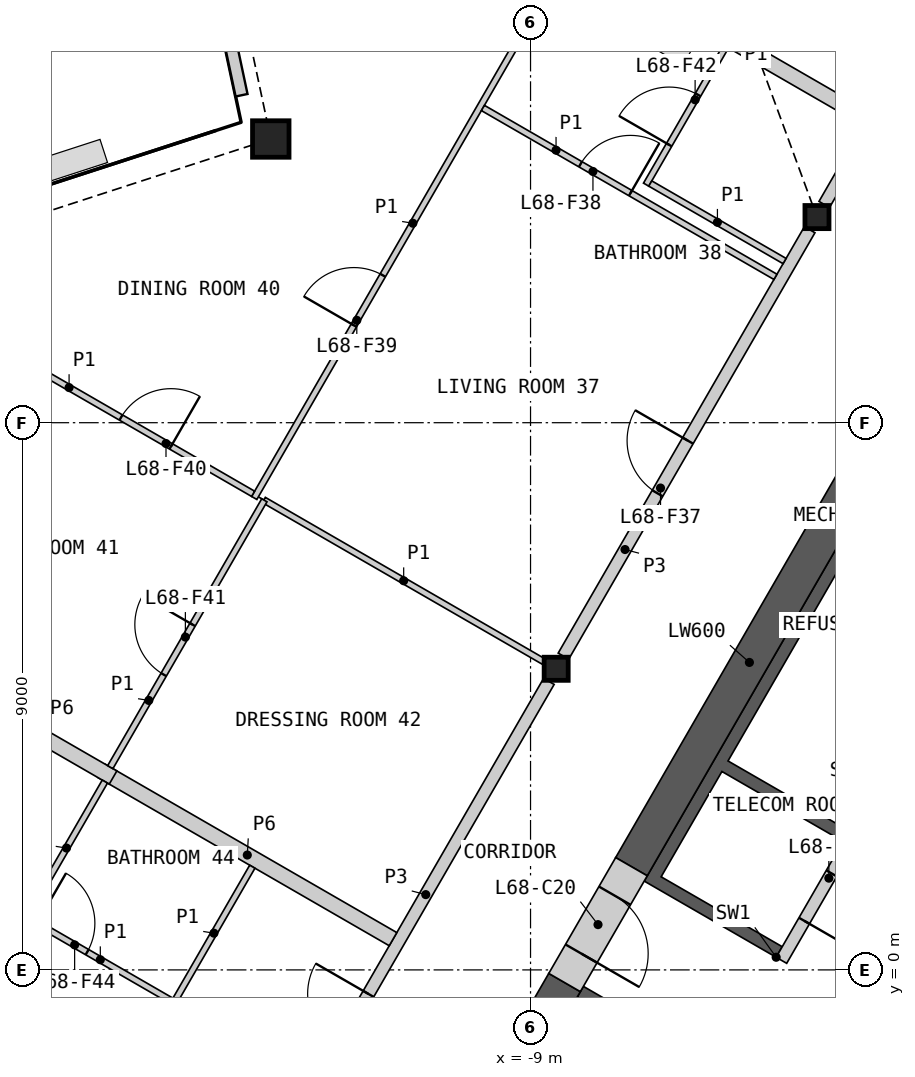
"""IFC4 building model, lengths in metres.
Left out: names, types, materials, properties, quantities, classifications, styles, units other than length and angle.
Written with IfcOpenShell. Run it as: python <this file> out.ifc"""

import sys

from ifc_helpers import new_model, si_unit, direction, frame, frame_2d, origin, origin_2d, place, context, subcontext, project, spatial, polyline, rectangle, hollow_rectangle, i_section, outline, extrude, element, fill, save


model = new_model("IFC4")
c1 = context("Model", 3, precision=1e-05, world=origin(), true_north=direction((0.0, 1.0)))
c2 = subcontext(c1, "Body", "Model", "MODEL_VIEW")
j1 = project(units=[si_unit("LENGTHUNIT", "METRE"), si_unit("PLANEANGLEUNIT", "RADIAN")], contexts=[c1])
p1 = place(None, origin())
s1 = spatial("IfcSite", under=j1, at=p1, CompositionType="ELEMENT")
p2 = place(p1, origin())
s2 = spatial("IfcBuilding", under=s1, at=p2, CompositionType="ELEMENT")
p3 = place(p2, frame((0.0, 0.0, 312.0)))
s3 = spatial("IfcBuildingStorey", under=s2, at=p3, CompositionType="ELEMENT", Elevation=312.0)
p4 = place(p3, frame((-13.272, 13.666, 0.0), z_axis=(0.0, 0.0, 1.0), x_axis=(1.0, 0.0, 0.0)))
e1 = element("IfcColumn", 1, at=p4, inside=s3, PredefinedType="COLUMN", context=c2, shape_type="SweptSolid", body=[
    extrude(hollow_rectangle(XDim=0.6, YDim=0.6, WallThickness=0.04, at=origin_2d()), origin(), (0.0, 0.0, 1.0), 3.4),
])
for number, where, z_axis, x_axis in (
    (2, (-4.289, 12.382, 0.0), (0.0, 0.0, 1.0), (1.0, 0.0, 0.0)),
    (3, (-8.578, 4.953, 0.0), (0.0, 0.0, 1.0), (1.0, 0.0, 0.0)),
):
    element("IfcColumn", number, at=place(p3, frame(where, z_axis=z_axis, x_axis=x_axis)), inside=s3, PredefinedType="COLUMN", context=c2, shape_type="SweptSolid", body=[
        extrude(i_section(OverallWidth=0.396, OverallDepth=0.381, WebThickness=0.019, FlangeThickness=0.03, at=origin_2d()), origin(), (0.0, 0.0, 1.0), 3.4),
    ])
p5 = place(p3, frame((-15.025, 20.372, 0.0), z_axis=(0.0, 0.0, 1.0), x_axis=(0.207932234858, -0.978143233738, 0.0)))
e4 = element("IfcWall", 4, at=p5, inside=s3, PredefinedType="SOLIDWALL", context=c2, shape_type="SweptSolid", body=[
    extrude(rectangle(XDim=6.12, YDim=0.2, at=frame_2d((3.06, 0.0))), origin(), (0.0, 0.0, 1.0), 2.488),
])
p6 = place(p5, frame((2.26, 0.0, 0.0)))
e5 = element("IfcOpeningElement", 5, at=p6, cuts=e4, PredefinedType="OPENING", context=c2, shape_type="SweptSolid", body=[
    extrude(rectangle(XDim=1.6, YDim=2.25, at=frame_2d((0.8, 1.125))), frame((0.0, 0.11, 0.0), z_axis=(0.0, -1.0, 0.0), x_axis=(1.0, 0.0, 0.0)), (0.0, 0.0, 1.0), 0.22),
])
p7 = place(p3, origin())
e6 = element("IfcWall", 6, at=p7, inside=s3, PredefinedType="SHEAR", context=c2, shape_type="SweptSolid", body=[
    extrude(outline(polyline([(-6.061, -1.697), (-8.231, -0.444), (-8.131, -0.271), (-5.96, -1.524), (-6.061, -1.697)])), origin(), (0.0, 0.0, 1.0), 3.1),
])
p8 = place(p3, origin())
e7 = element("IfcWall", 7, at=p8, inside=s3, PredefinedType="SHEAR", context=c2, shape_type="SweptSolid", body=[
    extrude(outline(polyline([(-4.96, 0.208), (-7.131, 1.461), (-3.731, 7.35), (-1.561, 6.097), (-1.66, 5.924), (-3.652, 7.074), (-5.752, 3.437), (-3.76, 2.287), (-3.861, 2.113), (-5.852, 3.263), (-6.852, 1.531), (-4.861, 0.381), (-4.96, 0.208)])), origin(), (0.0, 0.0, 1.0), 3.1),
])
p9 = place(p3, frame((-1.631, 5.776, 0.0), z_axis=(0.0, 0.0, 1.0), x_axis=(-0.499992876559, -0.866029516466, 0.0)))
e8 = element("IfcWall", 8, at=p9, inside=s3, PredefinedType="SOLIDWALL", context=c2, shape_type="SweptSolid", body=[
    extrude(rectangle(XDim=6.486, YDim=0.2, at=frame_2d((3.243, 0.0))), origin(), (0.0, 0.0, 1.0), 3.1),
])
p10 = place(p9, frame((1.537, 0.0, 0.0)))
e9 = element("IfcOpeningElement", 9, at=p10, cuts=e8, PredefinedType="OPENING", context=c2, shape_type="SweptSolid", body=[
    extrude(rectangle(XDim=0.9, YDim=2.1, at=frame_2d((0.45, 1.05))), frame((0.0, 0.11, 0.0), z_axis=(0.0, -1.0, 0.0), x_axis=(1.0, 0.0, 0.0)), (0.0, 0.0, 1.0), 0.22),
])
p11 = place(p9, frame((4.837, 0.0, 0.0)))
e10 = element("IfcOpeningElement", 10, at=p11, cuts=e8, PredefinedType="OPENING", context=c2, shape_type="SweptSolid", body=[
    extrude(rectangle(XDim=0.9, YDim=2.1, at=frame_2d((0.45, 1.05))), frame((0.0, 0.11, 0.0), z_axis=(0.0, -1.0, 0.0), x_axis=(1.0, 0.0, 0.0)), (0.0, 0.0, 1.0), 0.22),
])
p12 = place(p3, frame((-3.461, 8.417, 0.0), z_axis=(0.0, 0.0, 1.0), x_axis=(-0.50000391502, -0.866023143435, 0.0)))
e11 = element("IfcWall", 11, at=p12, inside=s3, PredefinedType="SHEAR", context=c2, shape_type="SweptSolid", body=[
    extrude(rectangle(XDim=7.759, YDim=0.6, at=frame_2d((3.879, 0.0))), origin(), (0.0, 0.0, 1.0), 3.1),
])
p13 = place(p3, frame((-8.44, -0.208, 0.0), z_axis=(0.0, 0.0, 1.0), x_axis=(-0.500007425856, -0.866021116422, 0.0)))
e12 = element("IfcWall", 12, at=p13, inside=s3, PredefinedType="SHEAR", context=c2, shape_type="SweptSolid", body=[
    extrude(rectangle(XDim=4.969, YDim=0.6, at=frame_2d((2.484, 0.0))), origin(), (0.0, 0.0, 1.0), 3.1),
])
p14 = place(p3, frame((-7.34, 1.698, 0.0), z_axis=(0.0, 0.0, 1.0), x_axis=(-0.50002983664, -0.866008176907, 0.0)))
e13 = element("IfcWall", 13, at=p14, inside=s3, PredefinedType="SHEAR", context=c2, shape_type="SweptSolid", body=[
    extrude(rectangle(XDim=2.2, YDim=0.6, at=frame_2d((1.1, 0.0))), origin(), (0.0, 0.0, 1.0), 3.1),
])
p15 = place(p14, frame((0.55, 0.0, 0.0)))
e14 = element("IfcOpeningElement", 14, at=p15, cuts=e13, PredefinedType="OPENING", context=c2, shape_type="SweptSolid", body=[
    extrude(rectangle(XDim=1.1, YDim=2.1, at=frame_2d((0.55, 1.05))), frame((0.0, 0.31, 0.0), z_axis=(0.0, -1.0, 0.0), x_axis=(1.0, 0.0, 0.0)), (0.0, 0.0, 1.0), 0.62),
])
p16 = place(p3, frame((-8.458, 5.16, 0.0), z_axis=(0.0, 0.0, 1.0), x_axis=(0.499984266882, 0.866034487114, 0.0)))
e15 = element("IfcWall", 15, at=p16, inside=s3, PredefinedType="PARTITIONING", context=c2, shape_type="SweptSolid", body=[
    extrude(rectangle(XDim=8.099, YDim=0.2, at=frame_2d((4.049, 0.0))), origin(), (0.0, 0.0, 1.0), 3.1),
])
p17 = place(p16, frame((3.093, 0.0, 0.0)))
e16 = element("IfcOpeningElement", 16, at=p17, cuts=e15, PredefinedType="OPENING", context=c2, shape_type="SweptSolid", body=[
    extrude(rectangle(XDim=1.0, YDim=2.1, at=frame_2d((0.5, 1.05))), frame((0.0, 0.11, 0.0), z_axis=(0.0, -1.0, 0.0), x_axis=(1.0, 0.0, 0.0)), (0.0, 0.0, 1.0), 0.22),
])
p18 = place(p3, frame((-12.748, -2.269, 0.0), z_axis=(0.0, 0.0, 1.0), x_axis=(0.499984266882, 0.866034487114, 0.0)))
e17 = element("IfcWall", 17, at=p18, inside=s3, PredefinedType="PARTITIONING", context=c2, shape_type="SweptSolid", body=[
    extrude(rectangle(XDim=8.099, YDim=0.2, at=frame_2d((4.049, 0.0))), origin(), (0.0, 0.0, 1.0), 3.1),
])
p19 = place(p18, frame((1.164, 0.0, 0.0)))
e18 = element("IfcOpeningElement", 18, at=p19, cuts=e17, PredefinedType="OPENING", context=c2, shape_type="SweptSolid", body=[
    extrude(rectangle(XDim=1.0, YDim=2.1, at=frame_2d((0.5, 1.05))), frame((0.0, 0.11, 0.0), z_axis=(0.0, -1.0, 0.0), x_axis=(1.0, 0.0, 0.0)), (0.0, 0.0, 1.0), 0.22),
])
p20 = place(p3, frame((-16.055, 3.273, 0.0), z_axis=(0.0, 0.0, 1.0), x_axis=(0.866019581949, -0.500010083578, 0.0)))
e19 = element("IfcWall", 19, at=p20, inside=s3, PredefinedType="PARTITIONING", context=c2, shape_type="SweptSolid", body=[
    extrude(rectangle(XDim=5.535, YDim=0.25, at=frame_2d((2.768, 0.0))), origin(), (0.0, 0.0, 1.0), 2.33),
])
p21 = place(p3, frame((-8.257, 16.76, 0.0), z_axis=(0.0, 0.0, 1.0), x_axis=(0.866034739526, -0.499983829672, 0.0)))
e20 = element("IfcWall", 20, at=p21, inside=s3, PredefinedType="PARTITIONING", context=c2, shape_type="SweptSolid", body=[
    extrude(rectangle(XDim=5.525, YDim=0.25, at=frame_2d((2.763, 0.0))), origin(), (0.0, 0.0, 1.0), 2.33),
])
p22 = place(p3, frame((-4.169, 12.59, 0.0), z_axis=(0.0, 0.0, 1.0), x_axis=(0.499950370306, 0.866054055606, 0.0)))
e21 = element("IfcWall", 21, at=p22, inside=s3, PredefinedType="PARTITIONING", context=c2, shape_type="SweptSolid", body=[
    extrude(rectangle(XDim=4.513, YDim=0.2, at=frame_2d((2.256, 0.0))), origin(), (0.0, 0.0, 1.0), 3.1),
])
p23 = place(p22, frame((2.459, 0.0, 0.0)))
e22 = element("IfcOpeningElement", 22, at=p23, cuts=e21, PredefinedType="OPENING", context=c2, shape_type="SweptSolid", body=[
    extrude(rectangle(XDim=1.0, YDim=2.1, at=frame_2d((0.5, 1.05))), frame((0.0, 0.11, 0.0), z_axis=(0.0, -1.0, 0.0), x_axis=(1.0, 0.0, 0.0)), (0.0, 0.0, 1.0), 0.22),
])
p24 = place(p3, frame((-18.092, 4.449, 0.0), z_axis=(0.0, 0.0, 1.0), x_axis=(0.866043267704, -0.499969057507, 0.0)))
e23 = element("IfcWall", 23, at=p24, inside=s3, PredefinedType="PARTITIONING", context=c2, shape_type="SweptSolid", body=[
    extrude(rectangle(XDim=2.571, YDim=0.25, at=frame_2d((1.286, 0.0))), origin(), (0.0, 0.0, 1.0), 2.33),
])
p25 = place(p3, frame((-24.815, 2.334, 0.0), z_axis=(0.0, 0.0, 1.0), x_axis=(0.866024591023, -0.500001407741, 0.0)))
e24 = element("IfcWall", 24, at=p25, inside=s3, PredefinedType="PARTITIONING", context=c2, shape_type="SweptSolid", body=[
    extrude(rectangle(XDim=12.652, YDim=0.1, at=frame_2d((6.326, 0.0))), origin(), (0.0, 0.0, 1.0), 2.33),
])
p26 = place(p25, frame((2.95, 0.0, 0.0)))
e25 = element("IfcOpeningElement", 25, at=p26, cuts=e24, PredefinedType="OPENING", context=c2, shape_type="SweptSolid", body=[
    extrude(rectangle(XDim=0.95, YDim=2.1, at=frame_2d((0.475, 1.05))), frame((0.0, 0.06, 0.0), z_axis=(0.0, -1.0, 0.0), x_axis=(1.0, 0.0, 0.0)), (0.0, 0.0, 1.0), 0.12),
])
p27 = place(p3, frame((-13.544, 7.762, 0.0), z_axis=(0.0, 0.0, 1.0), x_axis=(0.499993819111, 0.866028972293, 0.0)))
e26 = element("IfcWall", 26, at=p27, inside=s3, PredefinedType="PARTITIONING", context=c2, shape_type="SweptSolid", body=[
    extrude(rectangle(XDim=10.436, YDim=0.1, at=frame_2d((5.218, 0.0))), origin(), (0.0, 0.0, 1.0), 2.33),
])
p28 = place(p27, frame((3.279, 0.0, 0.0)))
e27 = element("IfcOpeningElement", 27, at=p28, cuts=e26, PredefinedType="OPENING", context=c2, shape_type="SweptSolid", body=[
    extrude(rectangle(XDim=0.95, YDim=2.1, at=frame_2d((0.475, 1.05))), frame((0.0, 0.06, 0.0), z_axis=(0.0, -1.0, 0.0), x_axis=(1.0, 0.0, 0.0)), (0.0, 0.0, 1.0), 0.12),
])
p29 = place(p3, frame((-19.615, 11.325, 0.0), z_axis=(0.0, 0.0, 1.0), x_axis=(0.866013987544, -0.500019772988, 0.0)))
e28 = element("IfcWall", 28, at=p29, inside=s3, PredefinedType="PARTITIONING", context=c2, shape_type="SweptSolid", body=[
    extrude(rectangle(XDim=6.99, YDim=0.1, at=frame_2d((3.495, 0.0))), origin(), (0.0, 0.0, 1.0), 2.33),
])
p30 = place(p29, frame((4.48, 0.0, 0.0)))
e29 = element("IfcOpeningElement", 29, at=p30, cuts=e28, PredefinedType="OPENING", context=c2, shape_type="SweptSolid", body=[
    extrude(rectangle(XDim=0.95, YDim=2.1, at=frame_2d((0.475, 1.05))), frame((0.0, 0.06, 0.0), z_axis=(0.0, -1.0, 0.0), x_axis=(1.0, 0.0, 0.0)), (0.0, 0.0, 1.0), 0.12),
])
p31 = place(p3, frame((-9.783, 14.177, 0.0), z_axis=(0.0, 0.0, 1.0), x_axis=(0.866030435321, -0.499991285022, 0.0)))
e30 = element("IfcWall", 30, at=p31, inside=s3, PredefinedType="PARTITIONING", context=c2, shape_type="SweptSolid", body=[
    extrude(rectangle(XDim=5.555, YDim=0.1, at=frame_2d((2.778, 0.0))), origin(), (0.0, 0.0, 1.0), 2.33),
])
p32 = place(p31, frame((1.852, 0.0, 0.0)))
e31 = element("IfcOpeningElement", 31, at=p32, cuts=e30, PredefinedType="OPENING", context=c2, shape_type="SweptSolid", body=[
    extrude(rectangle(XDim=0.95, YDim=2.1, at=frame_2d((0.475, 1.05))), frame((0.0, 0.06, 0.0), z_axis=(0.0, -1.0, 0.0), x_axis=(1.0, 0.0, 0.0)), (0.0, 0.0, 1.0), 0.12),
])
p33 = place(p3, frame((-7.099, 12.915, 0.0), z_axis=(0.0, 0.0, 1.0), x_axis=(0.49997732567, 0.866038494419, 0.0)))
e32 = element("IfcWall", 32, at=p33, inside=s3, PredefinedType="PARTITIONING", context=c2, shape_type="SweptSolid", body=[
    extrude(rectangle(XDim=5.5, YDim=0.1, at=frame_2d((2.75, 0.0))), origin(), (0.0, 0.0, 1.0), 2.33),
])
p34 = place(p33, frame((0.756, 0.0, 0.0)))
e33 = element("IfcOpeningElement", 33, at=p34, cuts=e32, PredefinedType="OPENING", context=c2, shape_type="SweptSolid", body=[
    extrude(rectangle(XDim=0.95, YDim=2.1, at=frame_2d((0.475, 1.05))), frame((0.0, 0.06, 0.0), z_axis=(0.0, -1.0, 0.0), x_axis=(1.0, 0.0, 0.0)), (0.0, 0.0, 1.0), 0.12),
])
p35 = place(p3, frame((-13.386, 7.729, 0.0), z_axis=(0.0, 0.0, 1.0), x_axis=(0.866034036823, -0.49998504684, 0.0)))
e34 = element("IfcWall", 34, at=p35, inside=s3, PredefinedType="PARTITIONING", context=c2, shape_type="SweptSolid", body=[
    extrude(rectangle(XDim=5.312, YDim=0.1, at=frame_2d((2.656, 0.0))), origin(), (0.0, 0.0, 1.0), 2.33),
])
p36 = place(p3, frame((-15.912, 3.335, 0.0), z_axis=(0.0, 0.0, 1.0), x_axis=(0.49999906822, 0.866025941747, 0.0)))
e35 = element("IfcWall", 35, at=p36, inside=s3, PredefinedType="PARTITIONING", context=c2, shape_type="SweptSolid", body=[
    extrude(rectangle(XDim=5.068, YDim=0.1, at=frame_2d((2.534, 0.0))), origin(), (0.0, 0.0, 1.0), 2.33),
])
p37 = place(p36, frame((1.757, 0.0, 0.0)))
e36 = element("IfcOpeningElement", 36, at=p37, cuts=e35, PredefinedType="OPENING", context=c2, shape_type="SweptSolid", body=[
    extrude(rectangle(XDim=0.95, YDim=2.1, at=frame_2d((0.475, 1.05))), frame((0.0, 0.06, 0.0), z_axis=(0.0, -1.0, 0.0), x_axis=(1.0, 0.0, 0.0)), (0.0, 0.0, 1.0), 0.12),
])
p38 = place(p3, frame((-17.331, 0.892, 0.0), z_axis=(0.0, 0.0, 1.0), x_axis=(0.866032775405, -0.499987231761, 0.0)))
e37 = element("IfcWall", 37, at=p38, inside=s3, PredefinedType="PARTITIONING", context=c2, shape_type="SweptSolid", body=[
    extrude(rectangle(XDim=2.9, YDim=0.1, at=frame_2d((1.45, 0.0))), origin(), (0.0, 0.0, 1.0), 2.33),
])
p39 = place(p38, frame((0.25, 0.0, 0.0)))
e38 = element("IfcOpeningElement", 38, at=p39, cuts=e37, PredefinedType="OPENING", context=c2, shape_type="SweptSolid", body=[
    extrude(rectangle(XDim=0.95, YDim=2.1, at=frame_2d((0.475, 1.05))), frame((0.0, 0.06, 0.0), z_axis=(0.0, -1.0, 0.0), x_axis=(1.0, 0.0, 0.0)), (0.0, 0.0, 1.0), 0.12),
])
for number, where, z_axis, x_axis in (
    (39, (-14.838, -0.489, 0.0), (0.0, 0.0, 1.0), (0.5, 0.866, 0.0)),
    (40, (-17.263, 0.911, 0.0), (0.0, 0.0, 1.0), (0.5, 0.866, 0.0)),
):
    element("IfcWall", number, at=place(p3, frame(where, z_axis=z_axis, x_axis=x_axis)), inside=s3, PredefinedType="PARTITIONING", context=c2, shape_type="SweptSolid", body=[
        extrude(rectangle(XDim=2.525, YDim=0.1, at=frame_2d((1.262, 0.0))), origin(), (0.0, 0.0, 1.0), 2.33),
    ])
p40 = place(p3, frame((-7.031, 12.934, 0.0), z_axis=(0.0, 0.0, 1.0), x_axis=(0.866030925526, -0.499990435942, 0.0)))
e41 = element("IfcWall", 41, at=p40, inside=s3, PredefinedType="PARTITIONING", context=c2, shape_type="SweptSolid", body=[
    extrude(rectangle(XDim=2.55, YDim=0.1, at=frame_2d((1.275, 0.0))), origin(), (0.0, 0.0, 1.0), 2.33),
])
p41 = place(p11, origin())
e42 = element("IfcDoor", 42, at=p41, inside=s3, OperationType="SINGLE_SWING_RIGHT", PredefinedType="DOOR", context=c2, shape_type="SweptSolid", body=[
    extrude(rectangle(XDim=0.9, YDim=2.1, at=frame_2d((0.45, 1.05))), frame((0.0, 0.025, 0.0), z_axis=(0.0, -1.0, 0.0), x_axis=(1.0, 0.0, 0.0)), (0.0, 0.0, 1.0), 0.05),
])
fill(e10, e42)
p42 = place(p15, origin())
e43 = element("IfcDoor", 43, at=p42, inside=s3, OperationType="SINGLE_SWING_RIGHT", PredefinedType="DOOR", context=c2, shape_type="SweptSolid", body=[
    extrude(rectangle(XDim=1.1, YDim=2.1, at=frame_2d((0.55, 1.05))), frame((0.0, 0.055, 0.0), z_axis=(0.0, -1.0, 0.0), x_axis=(1.0, 0.0, 0.0)), (0.0, 0.0, 1.0), 0.05),
])
fill(e14, e43)
p43 = place(p17, origin())
e44 = element("IfcDoor", 44, at=p43, inside=s3, OperationType="SINGLE_SWING_RIGHT", PredefinedType="DOOR", context=c2, shape_type="SweptSolid", body=[
    extrude(rectangle(XDim=1.0, YDim=2.1, at=frame_2d((0.5, 1.05))), frame((0.0, 0.025, 0.0), z_axis=(0.0, -1.0, 0.0), x_axis=(1.0, 0.0, 0.0)), (0.0, 0.0, 1.0), 0.05),
])
fill(e16, e44)
p44 = place(p32, origin())
e45 = element("IfcDoor", 45, at=p44, inside=s3, OperationType="SINGLE_SWING_RIGHT", PredefinedType="DOOR", context=c2, shape_type="SweptSolid", body=[
    extrude(rectangle(XDim=0.95, YDim=2.1, at=frame_2d((0.475, 1.05))), frame((0.0, 0.025, 0.0), z_axis=(0.0, -1.0, 0.0), x_axis=(1.0, 0.0, 0.0)), (0.0, 0.0, 1.0), 0.05),
])
fill(e31, e45)
p45 = place(p28, origin())
e46 = element("IfcDoor", 46, at=p45, inside=s3, OperationType="SINGLE_SWING_LEFT", PredefinedType="DOOR", context=c2, shape_type="SweptSolid", body=[
    extrude(rectangle(XDim=0.95, YDim=2.1, at=frame_2d((0.475, 1.05))), frame((0.0, 0.025, 0.0), z_axis=(0.0, -1.0, 0.0), x_axis=(1.0, 0.0, 0.0)), (0.0, 0.0, 1.0), 0.05),
])
fill(e27, e46)
p46 = place(p30, origin())
e47 = element("IfcDoor", 47, at=p46, inside=s3, OperationType="SINGLE_SWING_RIGHT", PredefinedType="DOOR", context=c2, shape_type="SweptSolid", body=[
    extrude(rectangle(XDim=0.95, YDim=2.1, at=frame_2d((0.475, 1.05))), frame((0.0, 0.025, 0.0), z_axis=(0.0, -1.0, 0.0), x_axis=(1.0, 0.0, 0.0)), (0.0, 0.0, 1.0), 0.05),
])
fill(e29, e47)
p47 = place(p37, origin())
e48 = element("IfcDoor", 48, at=p47, inside=s3, OperationType="SINGLE_SWING_RIGHT", PredefinedType="DOOR", context=c2, shape_type="SweptSolid", body=[
    extrude(rectangle(XDim=0.95, YDim=2.1, at=frame_2d((0.475, 1.05))), frame((0.0, 0.025, 0.0), z_axis=(0.0, -1.0, 0.0), x_axis=(1.0, 0.0, 0.0)), (0.0, 0.0, 1.0), 0.05),
])
fill(e36, e48)
p48 = place(p34, origin())
e49 = element("IfcDoor", 49, at=p48, inside=s3, OperationType="SINGLE_SWING_LEFT", PredefinedType="DOOR", context=c2, shape_type="SweptSolid", body=[
    extrude(rectangle(XDim=0.95, YDim=2.1, at=frame_2d((0.475, 1.05))), frame((0.0, 0.025, 0.0), z_axis=(0.0, -1.0, 0.0), x_axis=(1.0, 0.0, 0.0)), (0.0, 0.0, 1.0), 0.05),
])
fill(e33, e49)
p49 = place(p19, origin())
e50 = element("IfcDoor", 50, at=p49, inside=s3, OperationType="SINGLE_SWING_RIGHT", PredefinedType="DOOR", context=c2, shape_type="SweptSolid", body=[
    extrude(rectangle(XDim=1.0, YDim=2.1, at=frame_2d((0.5, 1.05))), frame((0.0, 0.025, 0.0), z_axis=(0.0, -1.0, 0.0), x_axis=(1.0, 0.0, 0.0)), (0.0, 0.0, 1.0), 0.05),
])
fill(e18, e50)
p50 = place(p39, origin())
e51 = element("IfcDoor", 51, at=p50, inside=s3, OperationType="SINGLE_SWING_LEFT", PredefinedType="DOOR", context=c2, shape_type="SweptSolid", body=[
    extrude(rectangle(XDim=0.95, YDim=2.1, at=frame_2d((0.475, 1.05))), frame((0.0, 0.025, 0.0), z_axis=(0.0, -1.0, 0.0), x_axis=(1.0, 0.0, 0.0)), (0.0, 0.0, 1.0), 0.05),
])
fill(e38, e51)
save(model, sys.argv[1])
